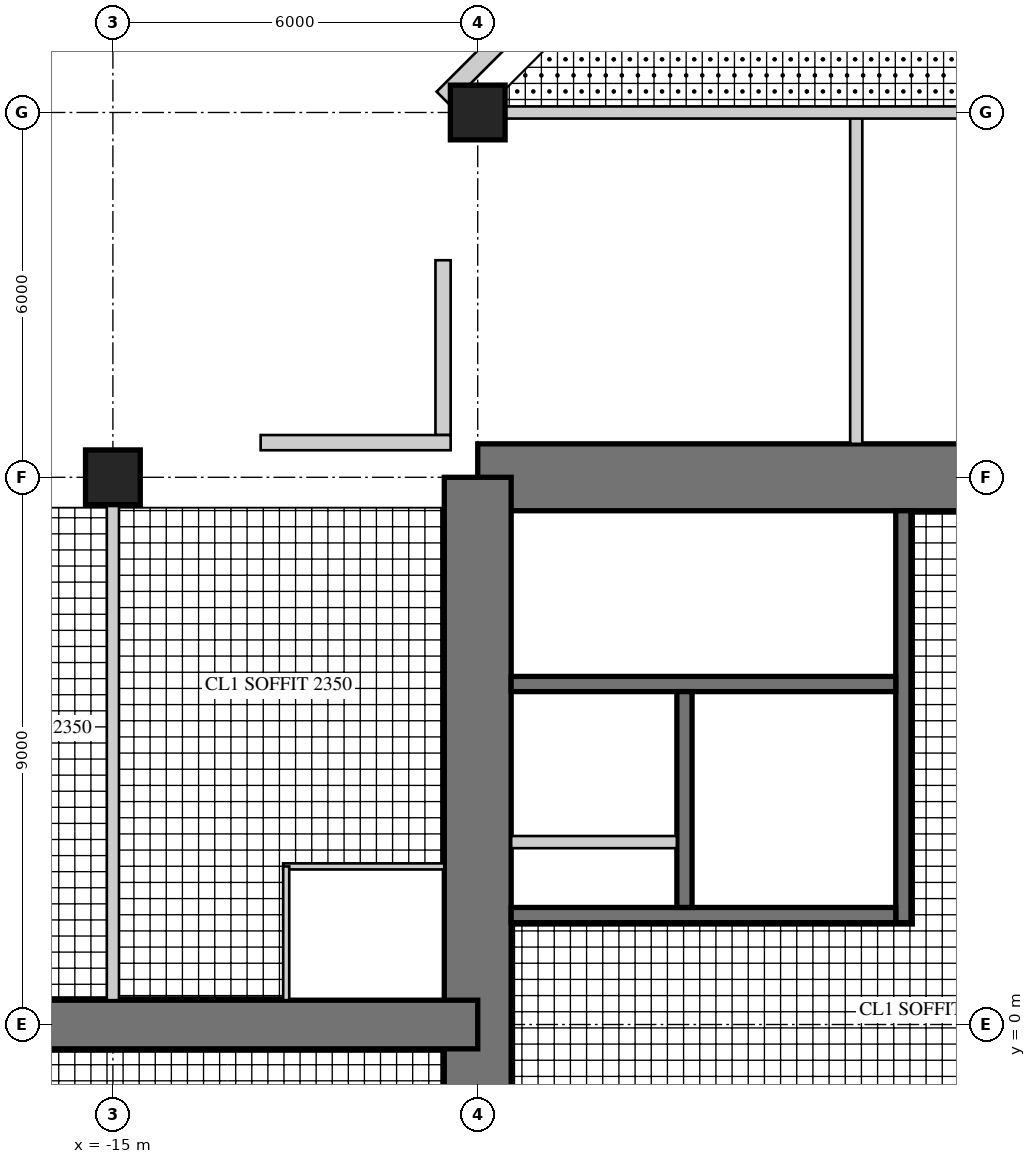
"""IFC4 building model, lengths in metres.
Left out: names, types, materials, properties, quantities, classifications, styles, units other than length and angle.
Written with IfcOpenShell. Run it as: python <this file> out.ifc"""

import sys

from ifc_helpers import new_model, si_unit, direction, frame, frame_2d, origin, origin_2d, place, context, subcontext, project, spatial, rectangle, hollow_rectangle, extrude, element, fill, save


model = new_model("IFC4")
c1 = context("Model", 3, precision=1e-05, world=origin(), true_north=direction((0.0, 1.0)))
c2 = subcontext(c1, "Body", "Model", "MODEL_VIEW")
j1 = project(units=[si_unit("LENGTHUNIT", "METRE"), si_unit("PLANEANGLEUNIT", "RADIAN")], contexts=[c1])
p1 = place(None, origin())
s1 = spatial("IfcSite", under=j1, at=p1, CompositionType="ELEMENT")
p2 = place(p1, origin())
s2 = spatial("IfcBuilding", under=s1, at=p2, CompositionType="ELEMENT")
p3 = place(p2, frame((0.0, 0.0, 189.9)))
s3 = spatial("IfcBuildingStorey", under=s2, at=p3, CompositionType="ELEMENT", Elevation=189.9)
p4 = place(p3, frame((9.0, 9.0, 0.0), z_axis=(0.0, 0.0, 1.0), x_axis=(-1.0, 0.0, 0.0)))
e1 = element("IfcWall", 1, at=p4, inside=s3, PredefinedType="SHEAR", context=c2, shape_type="SweptSolid", body=[
    extrude(rectangle(XDim=18.0, YDim=1.1, at=frame_2d((9.0, 0.0))), origin(), (0.0, 0.0, 1.0), 3.4),
])
p5 = place(p4, frame((9.8, 0.0, 0.0)))
e2 = element("IfcOpeningElement", 2, at=p5, cuts=e1, PredefinedType="OPENING", context=c2, shape_type="SweptSolid", body=[
    extrude(rectangle(XDim=1.0, YDim=2.4, at=frame_2d((0.5, 1.2))), frame((0.0, 0.56, 0.0), z_axis=(0.0, -1.0, 0.0), x_axis=(1.0, 0.0, 0.0)), (0.0, 0.0, 1.0), 1.12),
])
p6 = place(p3, frame((-9.0, 9.0, 0.0), z_axis=(0.0, 0.0, 1.0), x_axis=(0.0, -1.0, 0.0)))
e3 = element("IfcWall", 3, at=p6, inside=s3, PredefinedType="SHEAR", context=c2, shape_type="SweptSolid", body=[
    extrude(rectangle(XDim=18.0, YDim=1.1, at=frame_2d((9.0, 0.0))), origin(), (0.0, 0.0, 1.0), 3.4),
])
p7 = place(p6, frame((9.8, 0.0, 0.0)))
e4 = element("IfcOpeningElement", 4, at=p7, cuts=e3, PredefinedType="OPENING", context=c2, shape_type="SweptSolid", body=[
    extrude(rectangle(XDim=1.0, YDim=2.4, at=frame_2d((0.5, 1.2))), frame((0.0, 0.56, 0.0), z_axis=(0.0, -1.0, 0.0), x_axis=(1.0, 0.0, 0.0)), (0.0, 0.0, 1.0), 1.12),
])
p8 = place(p3, frame((-2.0, 1.675, 0.0), z_axis=(0.0, 0.0, 1.0), x_axis=(0.0, 1.0, 0.0)))
e5 = element("IfcWall", 5, at=p8, inside=s3, PredefinedType="SHEAR", context=c2, shape_type="SweptSolid", body=[
    extrude(rectangle(XDim=6.775, YDim=0.25, at=frame_2d((3.387, 0.0))), origin(), (0.0, 0.0, 1.0), 3.4),
])
p9 = place(p8, frame((0.725, 0.0, 0.0)))
e6 = element("IfcOpeningElement", 6, at=p9, cuts=e5, PredefinedType="OPENING", context=c2, shape_type="SweptSolid", body=[
    extrude(rectangle(XDim=1.0, YDim=2.1, at=frame_2d((0.5, 1.05))), frame((0.0, 0.135, 0.0), z_axis=(0.0, -1.0, 0.0), x_axis=(1.0, 0.0, 0.0)), (0.0, 0.0, 1.0), 0.27),
])
p10 = place(p3, frame((-2.125, 1.8, 0.0), z_axis=(0.0, 0.0, 1.0), x_axis=(-1.0, 0.0, 0.0)))
e7 = element("IfcWall", 7, at=p10, inside=s3, PredefinedType="SHEAR", context=c2, shape_type="SweptSolid", body=[
    extrude(rectangle(XDim=6.325, YDim=0.25, at=frame_2d((3.163, 0.0))), origin(), (0.0, 0.0, 1.0), 3.4),
])
p11 = place(p3, frame((-2.125, 5.6, 0.0), z_axis=(0.0, 0.0, 1.0), x_axis=(-1.0, 0.0, 0.0)))
e8 = element("IfcWall", 8, at=p11, inside=s3, PredefinedType="SHEAR", context=c2, shape_type="SweptSolid", body=[
    extrude(rectangle(XDim=6.325, YDim=0.25, at=frame_2d((3.163, 0.0))), origin(), (0.0, 0.0, 1.0), 3.4),
])
p12 = place(p11, frame((0.175, 0.0, 0.0)))
e9 = element("IfcOpeningElement", 9, at=p12, cuts=e8, PredefinedType="OPENING", context=c2, shape_type="SweptSolid", body=[
    extrude(rectangle(XDim=1.0, YDim=2.1, at=frame_2d((0.5, 1.05))), frame((0.0, 0.135, 0.0), z_axis=(0.0, -1.0, 0.0), x_axis=(1.0, 0.0, 0.0)), (0.0, 0.0, 1.0), 0.27),
])
p13 = place(p3, frame((-5.6, 1.925, 0.0), z_axis=(0.0, 0.0, 1.0), x_axis=(0.0, 1.0, 0.0)))
e10 = element("IfcWall", 10, at=p13, inside=s3, PredefinedType="SHEAR", context=c2, shape_type="SweptSolid", body=[
    extrude(rectangle(XDim=3.55, YDim=0.25, at=frame_2d((1.775, 0.0))), origin(), (0.0, 0.0, 1.0), 3.4),
])
p14 = place(p13, frame((1.525, 0.0, 0.0)))
e11 = element("IfcOpeningElement", 11, at=p14, cuts=e10, PredefinedType="OPENING", context=c2, shape_type="SweptSolid", body=[
    extrude(rectangle(XDim=1.1, YDim=2.2, at=frame_2d((0.55, 1.1))), frame((0.0, 0.135, 0.0), z_axis=(0.0, -1.0, 0.0), x_axis=(1.0, 0.0, 0.0)), (0.0, 0.0, 1.0), 0.27),
])
p15 = place(p13, frame((0.075, 0.0, 0.0)))
e12 = element("IfcOpeningElement", 12, at=p15, cuts=e10, PredefinedType="OPENING", context=c2, shape_type="SweptSolid", body=[
    extrude(rectangle(XDim=0.8, YDim=2.1, at=frame_2d((0.4, 1.05))), frame((0.0, 0.135, 0.0), z_axis=(0.0, -1.0, 0.0), x_axis=(1.0, 0.0, 0.0)), (0.0, 0.0, 1.0), 0.27),
])
p16 = place(p3, frame((-5.725, 3.0, 0.0), z_axis=(0.0, 0.0, 1.0), x_axis=(-1.0, 0.0, 0.0)))
e13 = element("IfcWall", 13, at=p16, inside=s3, PredefinedType="PARTITIONING", context=c2, shape_type="SweptSolid", body=[
    extrude(rectangle(XDim=2.725, YDim=0.2, at=frame_2d((1.362, 0.0))), origin(), (0.0, 0.0, 1.0), 3.4),
])
p17 = place(p3, frame((-9.0, 0.0, 0.0), z_axis=(0.0, 0.0, 1.0), x_axis=(-1.0, 0.0, 0.0)))
e14 = element("IfcWall", 14, at=p17, inside=s3, PredefinedType="SHEAR", context=c2, shape_type="SweptSolid", body=[
    extrude(rectangle(XDim=18.0, YDim=0.8, at=frame_2d((9.0, 0.0))), origin(), (0.0, 0.0, 1.0), 3.4),
])
p18 = place(p17, frame((3.95, 0.0, 0.0)))
e15 = element("IfcOpeningElement", 15, at=p18, cuts=e14, PredefinedType="OPENING", context=c2, shape_type="SweptSolid", body=[
    extrude(rectangle(XDim=1.0, YDim=2.15, at=frame_2d((0.5, 1.075))), frame((0.0, 0.41, 0.0), z_axis=(0.0, -1.0, 0.0), x_axis=(1.0, 0.0, 0.0)), (0.0, 0.0, 1.0), 0.82),
])
p19 = place(p17, frame((6.6, 0.0, 0.0)))
e16 = element("IfcOpeningElement", 16, at=p19, cuts=e14, PredefinedType="OPENING", context=c2, shape_type="SweptSolid", body=[
    extrude(rectangle(XDim=1.0, YDim=2.15, at=frame_2d((0.5, 1.075))), frame((0.0, 0.41, 0.0), z_axis=(0.0, -1.0, 0.0), x_axis=(1.0, 0.0, 0.0)), (0.0, 0.0, 1.0), 0.82),
])
p20 = place(p17, frame((13.25, 0.0, 0.0)))
e17 = element("IfcOpeningElement", 17, at=p20, cuts=e14, PredefinedType="OPENING", context=c2, shape_type="SweptSolid", body=[
    extrude(rectangle(XDim=1.0, YDim=2.2, at=frame_2d((0.5, 1.1))), frame((0.0, 0.41, 0.0), z_axis=(0.0, -1.0, 0.0), x_axis=(1.0, 0.0, 0.0)), (0.0, 0.0, 1.0), 0.82),
])
for number, where, z_axis, x_axis in (
    (18, (-9.0, 15.0, 0.0), (0.0, 0.0, 1.0), (1.0, 0.0, 0.0)),
    (19, (-15.0, 9.0, 0.0), (0.0, 0.0, 1.0), (1.0, 0.0, 0.0)),
):
    element("IfcColumn", number, at=place(p3, frame(where, z_axis=z_axis, x_axis=x_axis)), inside=s3, PredefinedType="COLUMN", context=c2, shape_type="SweptSolid", body=[
        extrude(rectangle(XDim=0.9, YDim=0.9, at=origin_2d()), origin(), (0.0, 0.0, 1.0), 3.4),
    ])
p21 = place(p3, frame((-6.406, 18.4, 0.0), z_axis=(0.0, 0.0, 1.0), x_axis=(-0.707134062067, -0.707079499254, 0.0)))
e20 = element("IfcWall", 20, at=p21, inside=s3, PredefinedType="SOLIDWALL", context=c2, shape_type="SweptSolid", body=[
    extrude(rectangle(XDim=4.475, YDim=0.3, at=frame_2d((2.237, 0.0))), origin(), (0.0, 0.0, 1.0), 3.22),
])
p22 = place(p21, frame((1.787, 0.0, 0.3)))
e21 = element("IfcOpeningElement", 21, at=p22, cuts=e20, PredefinedType="OPENING", context=c2, shape_type="SweptSolid", body=[
    extrude(rectangle(XDim=0.9, YDim=2.4, at=frame_2d((0.45, 1.2))), frame((0.0, 0.16, 0.0), z_axis=(0.0, -1.0, 0.0), x_axis=(1.0, 0.0, 0.0)), (0.0, 0.0, 1.0), 0.32),
])
p23 = place(p3, frame((-9.57, 12.57, 0.0), z_axis=(0.0, 0.0, 1.0), x_axis=(0.0, -1.0, 0.0)))
e22 = element("IfcWall", 22, at=p23, inside=s3, PredefinedType="SOLIDWALL", context=c2, shape_type="SweptSolid", body=[
    extrude(rectangle(XDim=2.875, YDim=0.25, at=frame_2d((1.438, 0.0))), origin(), (0.0, 0.0, 1.0), 3.22),
])
p24 = place(p23, frame((0.6, 0.0, 0.0)))
e23 = element("IfcOpeningElement", 23, at=p24, cuts=e22, PredefinedType="OPENING", context=c2, shape_type="SweptSolid", body=[
    extrude(rectangle(XDim=1.0, YDim=2.2, at=frame_2d((0.5, 1.1))), frame((0.0, 0.135, 0.0), z_axis=(0.0, -1.0, 0.0), x_axis=(1.0, 0.0, 0.0)), (0.0, 0.0, 1.0), 0.27),
])
p25 = place(p3, frame((-9.445, 9.57, 0.0), z_axis=(0.0, 0.0, 1.0), x_axis=(-1.0, 0.0, 0.0)))
e24 = element("IfcWall", 24, at=p25, inside=s3, PredefinedType="SOLIDWALL", context=c2, shape_type="SweptSolid", body=[
    extrude(rectangle(XDim=3.125, YDim=0.25, at=frame_2d((1.562, 0.0))), origin(), (0.0, 0.0, 1.0), 3.22),
])
p26 = place(p25, frame((0.6, 0.0, 0.0)))
e25 = element("IfcOpeningElement", 25, at=p26, cuts=e24, PredefinedType="OPENING", context=c2, shape_type="SweptSolid", body=[
    extrude(rectangle(XDim=1.0, YDim=2.2, at=frame_2d((0.5, 1.1))), frame((0.0, 0.135, 0.0), z_axis=(0.0, -1.0, 0.0), x_axis=(1.0, 0.0, 0.0)), (0.0, 0.0, 1.0), 0.27),
])
p27 = place(p3, frame((-2.775, 9.55, 0.0), z_axis=(0.0, 0.0, 1.0), x_axis=(0.0, 1.0, 0.0)))
e26 = element("IfcWall", 26, at=p27, inside=s3, PredefinedType="SOLIDWALL", context=c2, shape_type="SweptSolid", body=[
    extrude(rectangle(XDim=5.45, YDim=0.2, at=frame_2d((2.725, 0.0))), origin(), (0.0, 0.0, 1.0), 3.22),
])
p28 = place(p27, frame((1.2, 0.0, 0.0)))
e27 = element("IfcOpeningElement", 27, at=p28, cuts=e26, PredefinedType="OPENING", context=c2, shape_type="SweptSolid", body=[
    extrude(rectangle(XDim=1.0, YDim=2.2, at=frame_2d((0.5, 1.1))), frame((0.0, 0.11, 0.0), z_axis=(0.0, -1.0, 0.0), x_axis=(1.0, 0.0, 0.0)), (0.0, 0.0, 1.0), 0.22),
])
p29 = place(p3, frame((-0.4, 15.0, 0.0), z_axis=(0.0, 0.0, 1.0), x_axis=(-1.0, 0.0, 0.0)))
e28 = element("IfcWall", 28, at=p29, inside=s3, PredefinedType="SOLIDWALL", context=c2, shape_type="SweptSolid", body=[
    extrude(rectangle(XDim=8.15, YDim=0.2, at=frame_2d((4.075, 0.0))), origin(), (0.0, 0.0, 1.0), 2.47),
])
p30 = place(p29, frame((0.4, 0.0, 0.0)))
e29 = element("IfcOpeningElement", 29, at=p30, cuts=e28, PredefinedType="OPENING", context=c2, shape_type="SweptSolid", body=[
    extrude(rectangle(XDim=1.0, YDim=2.2, at=frame_2d((0.5, 1.1))), frame((0.0, 0.11, 0.0), z_axis=(0.0, -1.0, 0.0), x_axis=(1.0, 0.0, 0.0)), (0.0, 0.0, 1.0), 0.22),
])
p31 = place(p3, frame((-9.55, 2.6, 0.0), z_axis=(0.0, 0.0, 1.0), x_axis=(-1.0, 0.0, 0.0)))
e30 = element("IfcWall", 30, at=p31, inside=s3, PredefinedType="PARTITIONING", context=c2, shape_type="SweptSolid", body=[
    extrude(rectangle(XDim=2.65, YDim=0.1, at=frame_2d((1.325, 0.0))), origin(), (0.0, 0.0, 1.0), 3.22),
])
p32 = place(p3, frame((-12.15, 2.6, 0.0), z_axis=(0.0, 0.0, 1.0), x_axis=(0.0, -1.0, 0.0)))
e31 = element("IfcWall", 31, at=p32, inside=s3, PredefinedType="PARTITIONING", context=c2, shape_type="SweptSolid", body=[
    extrude(rectangle(XDim=2.2, YDim=0.1, at=frame_2d((1.1, 0.0))), origin(), (0.0, 0.0, 1.0), 3.22),
])
p33 = place(p32, frame((0.55, 0.0, 0.0)))
e32 = element("IfcOpeningElement", 32, at=p33, cuts=e31, PredefinedType="OPENING", context=c2, shape_type="SweptSolid", body=[
    extrude(rectangle(XDim=0.9, YDim=2.1, at=frame_2d((0.45, 1.05))), frame((0.0, 0.06, 0.0), z_axis=(0.0, -1.0, 0.0), x_axis=(1.0, 0.0, 0.0)), (0.0, 0.0, 1.0), 0.12),
])
p34 = place(p3, frame((-15.0, 8.55, 0.0), z_axis=(0.0, 0.0, 1.0), x_axis=(0.0, -1.0, 0.0)))
e33 = element("IfcWall", 33, at=p34, inside=s3, PredefinedType="SOLIDWALL", context=c2, shape_type="SweptSolid", body=[
    extrude(rectangle(XDim=8.15, YDim=0.2, at=frame_2d((4.075, 0.0))), origin(), (0.0, 0.0, 1.0), 2.47),
])
p35 = place(p24, origin())
e34 = element("IfcDoor", 34, at=p35, inside=s3, OperationType="SINGLE_SWING_RIGHT", PredefinedType="DOOR", context=c2, shape_type="SweptSolid", body=[
    extrude(hollow_rectangle(XDim=1.0, YDim=2.2, WallThickness=0.06, at=frame_2d((0.5, 1.1))), frame((0.0, 0.025, 0.0), z_axis=(0.0, -1.0, 0.0), x_axis=(1.0, 0.0, 0.0)), (0.0, 0.0, 1.0), 0.05),
    extrude(rectangle(XDim=0.879, YDim=2.079, at=frame_2d((0.5, 1.1))), frame((0.0, 0.025, 0.0), z_axis=(0.0, -1.0, 0.0), x_axis=(1.0, 0.0, 0.0)), (0.0, 0.0, 1.0), 0.05),
])
fill(e23, e34)
p36 = place(p26, origin())
e35 = element("IfcDoor", 35, at=p36, inside=s3, OperationType="SINGLE_SWING_LEFT", PredefinedType="DOOR", context=c2, shape_type="SweptSolid", body=[
    extrude(hollow_rectangle(XDim=1.0, YDim=2.2, WallThickness=0.06, at=frame_2d((0.5, 1.1))), frame((0.0, 0.025, 0.0), z_axis=(0.0, -1.0, 0.0), x_axis=(1.0, 0.0, 0.0)), (0.0, 0.0, 1.0), 0.05),
    extrude(rectangle(XDim=0.879, YDim=2.079, at=frame_2d((0.5, 1.1))), frame((0.0, 0.025, 0.0), z_axis=(0.0, -1.0, 0.0), x_axis=(1.0, 0.0, 0.0)), (0.0, 0.0, 1.0), 0.05),
])
fill(e25, e35)
p37 = place(p28, origin())
e36 = element("IfcDoor", 36, at=p37, inside=s3, OperationType="SINGLE_SWING_LEFT", PredefinedType="DOOR", context=c2, shape_type="SweptSolid", body=[
    extrude(rectangle(XDim=1.0, YDim=2.2, at=frame_2d((0.5, 1.1))), frame((0.0, 0.025, 0.0), z_axis=(0.0, -1.0, 0.0), x_axis=(1.0, 0.0, 0.0)), (0.0, 0.0, 1.0), 0.05),
])
fill(e27, e36)
p38 = place(p30, frame((1.0, 0.0, 0.0), z_axis=(0.0, 0.0, 1.0), x_axis=(-1.0, 0.0, 0.0)))
e37 = element("IfcDoor", 37, at=p38, inside=s3, OperationType="SINGLE_SWING_RIGHT", PredefinedType="DOOR", context=c2, shape_type="SweptSolid", body=[
    extrude(rectangle(XDim=1.0, YDim=2.2, at=frame_2d((0.5, 1.1))), frame((0.0, 0.025, 0.0), z_axis=(0.0, -1.0, 0.0), x_axis=(1.0, 0.0, 0.0)), (0.0, 0.0, 1.0), 0.05),
])
fill(e29, e37)
p39 = place(p33, origin())
e38 = element("IfcDoor", 38, at=p39, inside=s3, OperationType="SINGLE_SWING_LEFT", PredefinedType="DOOR", context=c2, shape_type="SweptSolid", body=[
    extrude(rectangle(XDim=0.9, YDim=2.1, at=frame_2d((0.45, 1.05))), frame((0.0, 0.025, 0.0), z_axis=(0.0, -1.0, 0.0), x_axis=(1.0, 0.0, 0.0)), (0.0, 0.0, 1.0), 0.05),
])
fill(e32, e38)
p40 = place(p18, frame((1.0, 0.0, 0.0), z_axis=(0.0, 0.0, 1.0), x_axis=(-1.0, 0.0, 0.0)))
e39 = element("IfcDoor", 39, at=p40, inside=s3, OperationType="SINGLE_SWING_RIGHT", PredefinedType="DOOR", context=c2, shape_type="SweptSolid", body=[
    extrude(rectangle(XDim=1.0, YDim=2.15, at=frame_2d((0.5, 1.075))), frame((0.0, 0.025, 0.0), z_axis=(0.0, -1.0, 0.0), x_axis=(1.0, 0.0, 0.0)), (0.0, 0.0, 1.0), 0.05),
])
fill(e15, e39)
p41 = place(p19, frame((1.0, 0.0, 0.0), z_axis=(0.0, 0.0, 1.0), x_axis=(-1.0, 0.0, 0.0)))
e40 = element("IfcDoor", 40, at=p41, inside=s3, OperationType="SINGLE_SWING_RIGHT", PredefinedType="DOOR", context=c2, shape_type="SweptSolid", body=[
    extrude(rectangle(XDim=1.0, YDim=2.15, at=frame_2d((0.5, 1.075))), frame((0.0, 0.025, 0.0), z_axis=(0.0, -1.0, 0.0), x_axis=(1.0, 0.0, 0.0)), (0.0, 0.0, 1.0), 0.05),
])
fill(e16, e40)
p42 = place(p5, origin())
e41 = element("IfcDoor", 41, at=p42, inside=s3, OperationType="SINGLE_SWING_RIGHT", PredefinedType="DOOR", context=c2, shape_type="SweptSolid", body=[
    extrude(rectangle(XDim=1.0, YDim=2.4, at=frame_2d((0.5, 1.2))), frame((0.0, 0.055, 0.0), z_axis=(0.0, -1.0, 0.0), x_axis=(1.0, 0.0, 0.0)), (0.0, 0.0, 1.0), 0.05),
])
fill(e2, e41)
p43 = place(p7, origin())
e42 = element("IfcDoor", 42, at=p43, inside=s3, OperationType="SINGLE_SWING_RIGHT", PredefinedType="DOOR", context=c2, shape_type="SweptSolid", body=[
    extrude(rectangle(XDim=1.0, YDim=2.4, at=frame_2d((0.5, 1.2))), frame((0.0, 0.055, 0.0), z_axis=(0.0, -1.0, 0.0), x_axis=(1.0, 0.0, 0.0)), (0.0, 0.0, 1.0), 0.05),
])
fill(e4, e42)
p44 = place(p9, origin())
e43 = element("IfcDoor", 43, at=p44, inside=s3, OperationType="SINGLE_SWING_LEFT", PredefinedType="DOOR", context=c2, shape_type="SweptSolid", body=[
    extrude(rectangle(XDim=1.0, YDim=2.1, at=frame_2d((0.5, 1.05))), frame((0.0, 0.025, 0.0), z_axis=(0.0, -1.0, 0.0), x_axis=(1.0, 0.0, 0.0)), (0.0, 0.0, 1.0), 0.05),
])
fill(e6, e43)
p45 = place(p12, frame((1.0, 0.0, 0.0), z_axis=(0.0, 0.0, 1.0), x_axis=(-1.0, 0.0, 0.0)))
e44 = element("IfcDoor", 44, at=p45, inside=s3, OperationType="SINGLE_SWING_RIGHT", PredefinedType="DOOR", context=c2, shape_type="SweptSolid", body=[
    extrude(rectangle(XDim=1.0, YDim=2.1, at=frame_2d((0.5, 1.05))), frame((0.0, 0.025, 0.0), z_axis=(0.0, -1.0, 0.0), x_axis=(1.0, 0.0, 0.0)), (0.0, 0.0, 1.0), 0.05),
])
fill(e9, e44)
p46 = place(p14, origin())
e45 = element("IfcDoor", 45, at=p46, inside=s3, OperationType="DOUBLE_DOOR_SLIDING", PredefinedType="DOOR", context=c2, shape_type="SweptSolid", body=[
    extrude(rectangle(XDim=1.1, YDim=2.2, at=frame_2d((0.55, 1.1))), frame((0.0, 0.025, 0.0), z_axis=(0.0, -1.0, 0.0), x_axis=(1.0, 0.0, 0.0)), (0.0, 0.0, 1.0), 0.05),
])
fill(e11, e45)
p47 = place(p15, origin())
e46 = element("IfcDoor", 46, at=p47, inside=s3, OperationType="SINGLE_SWING_LEFT", PredefinedType="DOOR", context=c2, shape_type="SweptSolid", body=[
    extrude(rectangle(XDim=0.8, YDim=2.1, at=frame_2d((0.4, 1.05))), frame((0.0, 0.025, 0.0), z_axis=(0.0, -1.0, 0.0), x_axis=(1.0, 0.0, 0.0)), (0.0, 0.0, 1.0), 0.05),
])
fill(e12, e46)
save(model, sys.argv[1])
